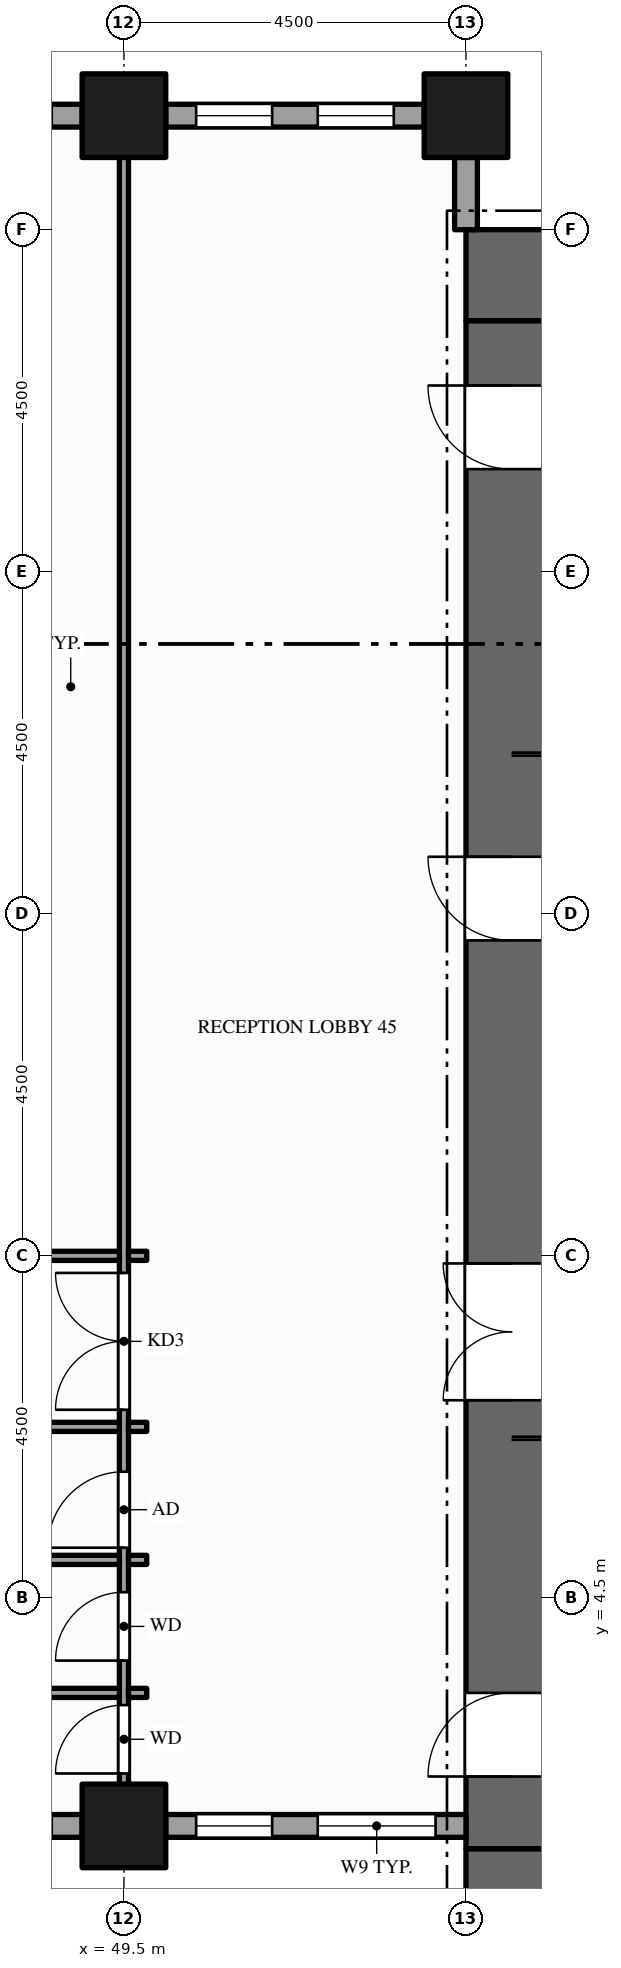
"""IFC4 building model, lengths in metres.
Left out: names, types, materials, properties, quantities, classifications, styles, units other than length and angle.
Written with IfcOpenShell. Run it as: python <this file> out.ifc"""

import sys

from ifc_helpers import new_model, si_unit, direction, frame, frame_2d, origin, origin_2d, place, context, subcontext, project, spatial, rectangle, hollow_rectangle, extrude, element, fill, save


model = new_model("IFC4")
c1 = context("Model", 3, precision=1e-05, world=origin(), true_north=direction((0.0, 1.0)))
c2 = subcontext(c1, "Body", "Model", "MODEL_VIEW")
j1 = project(units=[si_unit("LENGTHUNIT", "METRE"), si_unit("PLANEANGLEUNIT", "RADIAN")], contexts=[c1])
p1 = place(None, origin())
s1 = spatial("IfcSite", under=j1, at=p1, CompositionType="ELEMENT")
p2 = place(p1, origin())
s2 = spatial("IfcBuilding", under=s1, at=p2, CompositionType="ELEMENT")
p3 = place(p2, frame((0.0, 0.0, 57.0)))
s3 = spatial("IfcBuildingStorey", under=s2, at=p3, CompositionType="ELEMENT", Elevation=57.0)
for number, where, z_axis, x_axis in (
    (1, (67.5, 0.6, -0.15), (0.0, 0.0, 1.0), (-1.0, 0.0, 0.0)),
    (2, (54.0, 21.9, -0.15), (0.0, 0.0, 1.0), (1.0, 0.0, 0.0)),
):
    element("IfcWall", number, at=place(p3, frame(where, z_axis=z_axis, x_axis=x_axis)), inside=s3, PredefinedType="SHEAR", context=c2, shape_type="SweptSolid", body=[
        extrude(rectangle(XDim=13.5, YDim=1.2, at=frame_2d((6.75, 0.0))), origin(), (0.0, 0.0, 1.0), 4.0),
    ])
p4 = place(p3, frame((54.6, 1.2, -0.15), z_axis=(0.0, 0.0, 1.0), x_axis=(0.0, 1.0, 0.0)))
e3 = element("IfcWall", 3, at=p4, inside=s3, PredefinedType="SHEAR", context=c2, shape_type="SweptSolid", body=[
    extrude(rectangle(XDim=20.1, YDim=1.2, at=frame_2d((10.05, 0.0))), origin(), (0.0, 0.0, 1.0), 4.0),
])
p5 = place(p4, frame((5.9, 0.0, 0.15)))
e4 = element("IfcOpeningElement", 4, at=p5, cuts=e3, PredefinedType="OPENING", context=c2, shape_type="SweptSolid", body=[
    extrude(rectangle(XDim=1.8, YDim=2.1, at=frame_2d((0.9, 1.05))), frame((0.0, 0.61, 0.0), z_axis=(0.0, -1.0, 0.0), x_axis=(1.0, 0.0, 0.0)), (0.0, 0.0, 1.0), 1.22),
])
p6 = place(p4, frame((11.95, 0.0, 0.15)))
e5 = element("IfcOpeningElement", 5, at=p6, cuts=e3, PredefinedType="OPENING", context=c2, shape_type="SweptSolid", body=[
    extrude(rectangle(XDim=1.1, YDim=2.1, at=frame_2d((0.55, 1.05))), frame((0.0, 0.61, 0.0), z_axis=(0.0, -1.0, 0.0), x_axis=(1.0, 0.0, 0.0)), (0.0, 0.0, 1.0), 1.22),
])
p7 = place(p4, frame((0.95, 0.0, 0.15)))
e6 = element("IfcOpeningElement", 6, at=p7, cuts=e3, PredefinedType="OPENING", context=c2, shape_type="SweptSolid", body=[
    extrude(rectangle(XDim=1.1, YDim=2.1, at=frame_2d((0.55, 1.05))), frame((0.0, 0.61, 0.0), z_axis=(0.0, -1.0, 0.0), x_axis=(1.0, 0.0, 0.0)), (0.0, 0.0, 1.0), 1.22),
])
p8 = place(p4, frame((18.15, 0.0, 0.15)))
e7 = element("IfcOpeningElement", 7, at=p8, cuts=e3, PredefinedType="OPENING", context=c2, shape_type="SweptSolid", body=[
    extrude(rectangle(XDim=1.1, YDim=2.1, at=frame_2d((0.55, 1.05))), frame((0.0, 0.61, 0.0), z_axis=(0.0, -1.0, 0.0), x_axis=(1.0, 0.0, 0.0)), (0.0, 0.0, 1.0), 1.22),
])
for number, where, z_axis, x_axis in (
    (8, (49.5, 1.5, -0.15), (0.0, 0.0, 1.0), (1.0, 0.0, 0.0)),
    (9, (49.5, 24.0, -0.15), (0.0, 0.0, 1.0), (1.0, 0.0, 0.0)),
    (10, (54.0, 24.0, -0.15), (0.0, 0.0, 1.0), (1.0, 0.0, 0.0)),
):
    element("IfcColumn", number, at=place(p3, frame(where, z_axis=z_axis, x_axis=x_axis)), inside=s3, PredefinedType="COLUMN", context=c2, shape_type="SweptSolid", body=[
        extrude(hollow_rectangle(XDim=1.1, YDim=1.1, WallThickness=0.06, at=origin_2d()), origin(), (0.0, 0.0, 1.0), 4.0),
    ])
p9 = place(p3, frame((45.55, 1.5, 0.0), z_axis=(0.0, 0.0, 1.0), x_axis=(1.0, 0.0, 0.0)))
e11 = element("IfcWall", 11, at=p9, inside=s3, PredefinedType="STANDARD", context=c2, shape_type="SweptSolid", body=[
    extrude(rectangle(XDim=3.4, YDim=0.3, at=frame_2d((1.7, 0.0))), origin(), (0.0, 0.0, 1.0), 3.144),
])
p10 = place(p9, frame((0.4, 0.0, 0.9)))
e12 = element("IfcOpeningElement", 12, at=p10, cuts=e11, PredefinedType="OPENING", context=c2, shape_type="SweptSolid", body=[
    extrude(rectangle(XDim=1.0, YDim=2.0, at=frame_2d((0.5, 1.0))), frame((0.0, 0.16, 0.0), z_axis=(0.0, -1.0, 0.0), x_axis=(1.0, 0.0, 0.0)), (0.0, 0.0, 1.0), 0.32),
])
p11 = place(p9, frame((2.0, 0.0, 0.9)))
e13 = element("IfcOpeningElement", 13, at=p11, cuts=e11, PredefinedType="OPENING", context=c2, shape_type="SweptSolid", body=[
    extrude(rectangle(XDim=1.0, YDim=2.0, at=frame_2d((0.5, 1.0))), frame((0.0, 0.16, 0.0), z_axis=(0.0, -1.0, 0.0), x_axis=(1.0, 0.0, 0.0)), (0.0, 0.0, 1.0), 0.32),
])
p12 = place(p3, frame((50.05, 1.5, 0.0), z_axis=(0.0, 0.0, 1.0), x_axis=(1.0, 0.0, 0.0)))
e14 = element("IfcWall", 14, at=p12, inside=s3, PredefinedType="STANDARD", context=c2, shape_type="SweptSolid", body=[
    extrude(rectangle(XDim=3.95, YDim=0.3, at=frame_2d((1.975, 0.0))), origin(), (0.0, 0.0, 1.0), 3.144),
])
p13 = place(p12, frame((0.4, 0.0, 0.9)))
e15 = element("IfcOpeningElement", 15, at=p13, cuts=e14, PredefinedType="OPENING", context=c2, shape_type="SweptSolid", body=[
    extrude(rectangle(XDim=1.0, YDim=2.0, at=frame_2d((0.5, 1.0))), frame((0.0, 0.16, 0.0), z_axis=(0.0, -1.0, 0.0), x_axis=(1.0, 0.0, 0.0)), (0.0, 0.0, 1.0), 0.32),
])
p14 = place(p12, frame((2.0, 0.0, 0.9)))
e16 = element("IfcOpeningElement", 16, at=p14, cuts=e14, PredefinedType="OPENING", context=c2, shape_type="SweptSolid", body=[
    extrude(rectangle(XDim=1.55, YDim=2.0, at=frame_2d((0.775, 1.0))), frame((0.0, 0.16, 0.0), z_axis=(0.0, -1.0, 0.0), x_axis=(1.0, 0.0, 0.0)), (0.0, 0.0, 1.0), 0.32),
])
p15 = place(p3, frame((54.0, 22.5, 0.0), z_axis=(0.0, 0.0, 1.0), x_axis=(0.0, 1.0, 0.0)))
e17 = element("IfcWall", 17, at=p15, inside=s3, PredefinedType="STANDARD", context=c2, shape_type="SweptSolid", body=[
    extrude(rectangle(XDim=0.95, YDim=0.3, at=frame_2d((0.475, 0.0))), origin(), (0.0, 0.0, 1.0), 3.144),
])
p16 = place(p3, frame((53.45, 24.0, 0.0), z_axis=(0.0, 0.0, 1.0), x_axis=(-1.0, 0.0, 0.0)))
e18 = element("IfcWall", 18, at=p16, inside=s3, PredefinedType="STANDARD", context=c2, shape_type="SweptSolid", body=[
    extrude(rectangle(XDim=3.4, YDim=0.3, at=frame_2d((1.7, 0.0))), origin(), (0.0, 0.0, 1.0), 3.144),
])
p17 = place(p16, frame((0.4, 0.0, 0.9)))
e19 = element("IfcOpeningElement", 19, at=p17, cuts=e18, PredefinedType="OPENING", context=c2, shape_type="SweptSolid", body=[
    extrude(rectangle(XDim=1.0, YDim=2.0, at=frame_2d((0.5, 1.0))), frame((0.0, 0.16, 0.0), z_axis=(0.0, -1.0, 0.0), x_axis=(1.0, 0.0, 0.0)), (0.0, 0.0, 1.0), 0.32),
])
p18 = place(p16, frame((2.0, 0.0, 0.9)))
e20 = element("IfcOpeningElement", 20, at=p18, cuts=e18, PredefinedType="OPENING", context=c2, shape_type="SweptSolid", body=[
    extrude(rectangle(XDim=1.0, YDim=2.0, at=frame_2d((0.5, 1.0))), frame((0.0, 0.16, 0.0), z_axis=(0.0, -1.0, 0.0), x_axis=(1.0, 0.0, 0.0)), (0.0, 0.0, 1.0), 0.32),
])
p19 = place(p3, frame((48.95, 24.0, 0.0), z_axis=(0.0, 0.0, 1.0), x_axis=(-1.0, 0.0, 0.0)))
e21 = element("IfcWall", 21, at=p19, inside=s3, PredefinedType="STANDARD", context=c2, shape_type="SweptSolid", body=[
    extrude(rectangle(XDim=3.4, YDim=0.3, at=frame_2d((1.7, 0.0))), origin(), (0.0, 0.0, 1.0), 3.144),
])
p20 = place(p19, frame((0.4, 0.0, 0.9)))
e22 = element("IfcOpeningElement", 22, at=p20, cuts=e21, PredefinedType="OPENING", context=c2, shape_type="SweptSolid", body=[
    extrude(rectangle(XDim=1.0, YDim=2.0, at=frame_2d((0.5, 1.0))), frame((0.0, 0.16, 0.0), z_axis=(0.0, -1.0, 0.0), x_axis=(1.0, 0.0, 0.0)), (0.0, 0.0, 1.0), 0.32),
])
p21 = place(p19, frame((2.0, 0.0, 0.9)))
e23 = element("IfcOpeningElement", 23, at=p21, cuts=e21, PredefinedType="OPENING", context=c2, shape_type="SweptSolid", body=[
    extrude(rectangle(XDim=1.0, YDim=2.0, at=frame_2d((0.5, 1.0))), frame((0.0, 0.16, 0.0), z_axis=(0.0, -1.0, 0.0), x_axis=(1.0, 0.0, 0.0)), (0.0, 0.0, 1.0), 0.32),
])
p22 = place(p3, frame((49.5, 1.65, 0.0), z_axis=(0.0, 0.0, 1.0), x_axis=(0.0, 1.0, 0.0)))
e24 = element("IfcWall", 24, at=p22, inside=s3, PredefinedType="PARTITIONING", context=c2, shape_type="SweptSolid", body=[
    extrude(rectangle(XDim=22.2, YDim=0.12, at=frame_2d((11.1, 0.0))), origin(), (0.0, 0.0, 1.0), 2.938),
])
p23 = place(p22, frame((5.325, 0.0, 0.0)))
e25 = element("IfcOpeningElement", 25, at=p23, cuts=e24, PredefinedType="OPENING", context=c2, shape_type="SweptSolid", body=[
    extrude(rectangle(XDim=1.8, YDim=2.1, at=frame_2d((0.9, 1.05))), frame((0.0, 0.07, 0.0), z_axis=(0.0, -1.0, 0.0), x_axis=(1.0, 0.0, 0.0)), (0.0, 0.0, 1.0), 0.14),
])
p24 = place(p22, frame((0.54, 0.0, 0.0)))
e26 = element("IfcOpeningElement", 26, at=p24, cuts=e24, PredefinedType="OPENING", context=c2, shape_type="SweptSolid", body=[
    extrude(rectangle(XDim=0.9, YDim=2.1, at=frame_2d((0.45, 1.05))), frame((0.0, 0.07, 0.0), z_axis=(0.0, -1.0, 0.0), x_axis=(1.0, 0.0, 0.0)), (0.0, 0.0, 1.0), 0.14),
])
p25 = place(p22, frame((2.025, 0.0, 0.0)))
e27 = element("IfcOpeningElement", 27, at=p25, cuts=e24, PredefinedType="OPENING", context=c2, shape_type="SweptSolid", body=[
    extrude(rectangle(XDim=0.9, YDim=2.1, at=frame_2d((0.45, 1.05))), frame((0.0, 0.07, 0.0), z_axis=(0.0, -1.0, 0.0), x_axis=(1.0, 0.0, 0.0)), (0.0, 0.0, 1.0), 0.14),
])
p26 = place(p22, frame((3.51, 0.0, 0.0)))
e28 = element("IfcOpeningElement", 28, at=p26, cuts=e24, PredefinedType="OPENING", context=c2, shape_type="SweptSolid", body=[
    extrude(rectangle(XDim=1.0, YDim=2.1, at=frame_2d((0.5, 1.05))), frame((0.0, 0.07, 0.0), z_axis=(0.0, -1.0, 0.0), x_axis=(1.0, 0.0, 0.0)), (0.0, 0.0, 1.0), 0.14),
])
p27 = place(p3, frame((45.06, 3.25, 0.0), z_axis=(0.0, 0.0, 1.0), x_axis=(1.0, 0.0, 0.0)))
e29 = element("IfcWall", 29, at=p27, inside=s3, PredefinedType="PARTITIONING", context=c2, shape_type="SweptSolid", body=[
    extrude(rectangle(XDim=4.38, YDim=0.12, at=frame_2d((2.19, 0.0))), origin(), (0.0, 0.0, 1.0), 2.938),
])
p28 = place(p3, frame((49.56, 3.25, 0.0), z_axis=(0.0, 0.0, 1.0), x_axis=(1.0, 0.0, 0.0)))
e30 = element("IfcWall", 30, at=p28, inside=s3, PredefinedType="PARTITIONING", context=c2, shape_type="SweptSolid", body=[
    extrude(rectangle(XDim=0.24, YDim=0.12, at=frame_2d((0.12, 0.0))), origin(), (0.0, 0.0, 1.0), 2.938),
])
p29 = place(p3, frame((45.06, 5.0, 0.0), z_axis=(0.0, 0.0, 1.0), x_axis=(1.0, 0.0, 0.0)))
e31 = element("IfcWall", 31, at=p29, inside=s3, PredefinedType="PARTITIONING", context=c2, shape_type="SweptSolid", body=[
    extrude(rectangle(XDim=4.38, YDim=0.12, at=frame_2d((2.19, 0.0))), origin(), (0.0, 0.0, 1.0), 2.938),
])
p30 = place(p3, frame((49.56, 5.0, 0.0), z_axis=(0.0, 0.0, 1.0), x_axis=(1.0, 0.0, 0.0)))
e32 = element("IfcWall", 32, at=p30, inside=s3, PredefinedType="PARTITIONING", context=c2, shape_type="SweptSolid", body=[
    extrude(rectangle(XDim=0.24, YDim=0.12, at=frame_2d((0.12, 0.0))), origin(), (0.0, 0.0, 1.0), 2.938),
])
p31 = place(p3, frame((45.06, 6.75, 0.0), z_axis=(0.0, 0.0, 1.0), x_axis=(1.0, 0.0, 0.0)))
e33 = element("IfcWall", 33, at=p31, inside=s3, PredefinedType="PARTITIONING", context=c2, shape_type="SweptSolid", body=[
    extrude(rectangle(XDim=4.38, YDim=0.12, at=frame_2d((2.19, 0.0))), origin(), (0.0, 0.0, 1.0), 2.938),
])
p32 = place(p3, frame((49.56, 6.75, 0.0), z_axis=(0.0, 0.0, 1.0), x_axis=(1.0, 0.0, 0.0)))
e34 = element("IfcWall", 34, at=p32, inside=s3, PredefinedType="PARTITIONING", context=c2, shape_type="SweptSolid", body=[
    extrude(rectangle(XDim=0.24, YDim=0.12, at=frame_2d((0.12, 0.0))), origin(), (0.0, 0.0, 1.0), 2.938),
])
p33 = place(p3, frame((45.06, 9.0, 0.0), z_axis=(0.0, 0.0, 1.0), x_axis=(1.0, 0.0, 0.0)))
e35 = element("IfcWall", 35, at=p33, inside=s3, PredefinedType="PARTITIONING", context=c2, shape_type="SweptSolid", body=[
    extrude(rectangle(XDim=4.38, YDim=0.12, at=frame_2d((2.19, 0.0))), origin(), (0.0, 0.0, 1.0), 2.938),
])
p34 = place(p33, frame((1.59, 0.0, 0.0)))
e36 = element("IfcOpeningElement", 36, at=p34, cuts=e35, PredefinedType="OPENING", context=c2, shape_type="SweptSolid", body=[
    extrude(rectangle(XDim=1.2, YDim=2.1, at=frame_2d((0.6, 1.05))), frame((0.0, 0.07, 0.0), z_axis=(0.0, -1.0, 0.0), x_axis=(1.0, 0.0, 0.0)), (0.0, 0.0, 1.0), 0.14),
])
p35 = place(p3, frame((49.56, 9.0, 0.0), z_axis=(0.0, 0.0, 1.0), x_axis=(1.0, 0.0, 0.0)))
e37 = element("IfcWall", 37, at=p35, inside=s3, PredefinedType="PARTITIONING", context=c2, shape_type="SweptSolid", body=[
    extrude(rectangle(XDim=0.24, YDim=0.12, at=frame_2d((0.12, 0.0))), origin(), (0.0, 0.0, 1.0), 2.938),
])
p36 = place(p13, origin())
e38 = element("IfcWindow", 38, at=p36, inside=s3, PartitioningType="SINGLE_PANEL", PredefinedType="WINDOW", context=c2, shape_type="SweptSolid", body=[
    extrude(rectangle(XDim=1.0, YDim=2.0, at=frame_2d((0.5, 1.0))), frame((0.0, 0.03, 0.0), z_axis=(0.0, -1.0, 0.0), x_axis=(1.0, 0.0, 0.0)), (0.0, 0.0, 1.0), 0.06),
])
fill(e15, e38)
p37 = place(p14, origin())
e39 = element("IfcWindow", 39, at=p37, inside=s3, PartitioningType="SINGLE_PANEL", PredefinedType="WINDOW", context=c2, shape_type="SweptSolid", body=[
    extrude(rectangle(XDim=1.55, YDim=2.0, at=frame_2d((0.775, 1.0))), frame((0.0, 0.03, 0.0), z_axis=(0.0, -1.0, 0.0), x_axis=(1.0, 0.0, 0.0)), (0.0, 0.0, 1.0), 0.06),
])
fill(e16, e39)
p38 = place(p17, origin())
e40 = element("IfcWindow", 40, at=p38, inside=s3, PartitioningType="SINGLE_PANEL", PredefinedType="WINDOW", context=c2, shape_type="SweptSolid", body=[
    extrude(rectangle(XDim=1.0, YDim=2.0, at=frame_2d((0.5, 1.0))), frame((0.0, 0.03, 0.0), z_axis=(0.0, -1.0, 0.0), x_axis=(1.0, 0.0, 0.0)), (0.0, 0.0, 1.0), 0.06),
])
fill(e19, e40)
p39 = place(p18, origin())
e41 = element("IfcWindow", 41, at=p39, inside=s3, PartitioningType="SINGLE_PANEL", PredefinedType="WINDOW", context=c2, shape_type="SweptSolid", body=[
    extrude(rectangle(XDim=1.0, YDim=2.0, at=frame_2d((0.5, 1.0))), frame((0.0, 0.03, 0.0), z_axis=(0.0, -1.0, 0.0), x_axis=(1.0, 0.0, 0.0)), (0.0, 0.0, 1.0), 0.06),
])
fill(e20, e41)
p40 = place(p5, origin())
e42 = element("IfcDoor", 42, at=p40, inside=s3, OperationType="DOUBLE_DOOR_SINGLE_SWING", PredefinedType="DOOR", context=c2, shape_type="SweptSolid", body=[
    extrude(rectangle(XDim=1.8, YDim=2.1, at=frame_2d((0.9, 1.05))), frame((0.0, 0.025, 0.0), z_axis=(0.0, -1.0, 0.0), x_axis=(1.0, 0.0, 0.0)), (0.0, 0.0, 1.0), 0.05),
])
fill(e4, e42)
p41 = place(p6, origin())
e43 = element("IfcDoor", 43, at=p41, inside=s3, OperationType="SINGLE_SWING_RIGHT", PredefinedType="DOOR", context=c2, shape_type="SweptSolid", body=[
    extrude(rectangle(XDim=1.1, YDim=2.1, at=frame_2d((0.55, 1.05))), frame((0.0, 0.025, 0.0), z_axis=(0.0, -1.0, 0.0), x_axis=(1.0, 0.0, 0.0)), (0.0, 0.0, 1.0), 0.05),
])
fill(e5, e43)
p42 = place(p7, origin())
e44 = element("IfcDoor", 44, at=p42, inside=s3, OperationType="SINGLE_SWING_LEFT", PredefinedType="DOOR", context=c2, shape_type="SweptSolid", body=[
    extrude(rectangle(XDim=1.1, YDim=2.1, at=frame_2d((0.55, 1.05))), frame((0.0, 0.025, 0.0), z_axis=(0.0, -1.0, 0.0), x_axis=(1.0, 0.0, 0.0)), (0.0, 0.0, 1.0), 0.05),
])
fill(e6, e44)
p43 = place(p8, origin())
e45 = element("IfcDoor", 45, at=p43, inside=s3, OperationType="SINGLE_SWING_RIGHT", PredefinedType="DOOR", context=c2, shape_type="SweptSolid", body=[
    extrude(rectangle(XDim=1.1, YDim=2.1, at=frame_2d((0.55, 1.05))), frame((0.0, 0.025, 0.0), z_axis=(0.0, -1.0, 0.0), x_axis=(1.0, 0.0, 0.0)), (0.0, 0.0, 1.0), 0.05),
])
fill(e7, e45)
p44 = place(p23, origin())
e46 = element("IfcDoor", 46, at=p44, inside=s3, OperationType="DOUBLE_DOOR_SINGLE_SWING", PredefinedType="DOOR", context=c2, shape_type="SweptSolid", body=[
    extrude(rectangle(XDim=1.8, YDim=2.1, at=frame_2d((0.9, 1.05))), frame((0.0, 0.025, 0.0), z_axis=(0.0, -1.0, 0.0), x_axis=(1.0, 0.0, 0.0)), (0.0, 0.0, 1.0), 0.05),
])
fill(e25, e46)
p45 = place(p24, origin())
e47 = element("IfcDoor", 47, at=p45, inside=s3, OperationType="SINGLE_SWING_LEFT", PredefinedType="DOOR", context=c2, shape_type="SweptSolid", body=[
    extrude(rectangle(XDim=0.9, YDim=2.1, at=frame_2d((0.45, 1.05))), frame((0.0, 0.025, 0.0), z_axis=(0.0, -1.0, 0.0), x_axis=(1.0, 0.0, 0.0)), (0.0, 0.0, 1.0), 0.05),
])
fill(e26, e47)
p46 = place(p25, origin())
e48 = element("IfcDoor", 48, at=p46, inside=s3, OperationType="SINGLE_SWING_LEFT", PredefinedType="DOOR", context=c2, shape_type="SweptSolid", body=[
    extrude(rectangle(XDim=0.9, YDim=2.1, at=frame_2d((0.45, 1.05))), frame((0.0, 0.025, 0.0), z_axis=(0.0, -1.0, 0.0), x_axis=(1.0, 0.0, 0.0)), (0.0, 0.0, 1.0), 0.05),
])
fill(e27, e48)
p47 = place(p26, origin())
e49 = element("IfcDoor", 49, at=p47, inside=s3, OperationType="SINGLE_SWING_LEFT", PredefinedType="DOOR", context=c2, shape_type="SweptSolid", body=[
    extrude(rectangle(XDim=1.0, YDim=2.1, at=frame_2d((0.5, 1.05))), frame((0.0, 0.025, 0.0), z_axis=(0.0, -1.0, 0.0), x_axis=(1.0, 0.0, 0.0)), (0.0, 0.0, 1.0), 0.05),
])
fill(e28, e49)
save(model, sys.argv[1])
